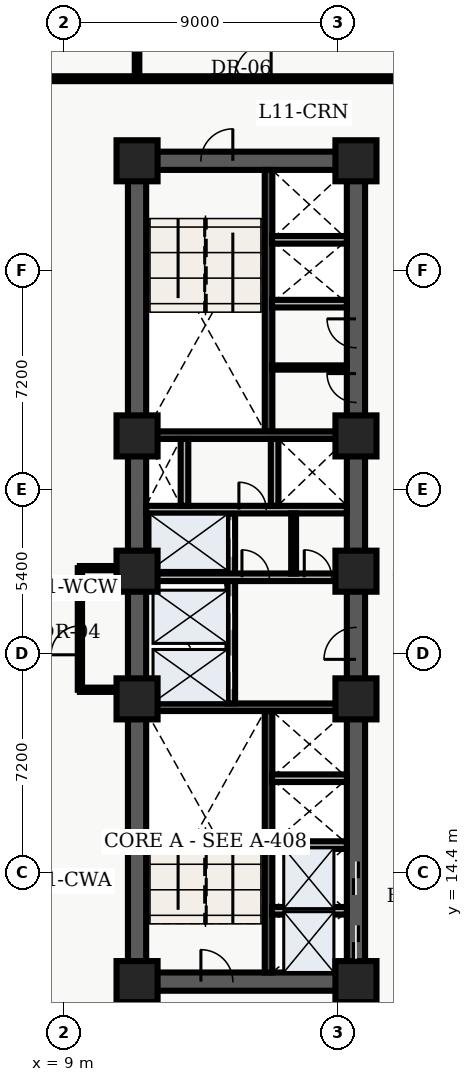
"""IFC4 building model, lengths in metres.
Left out: names, types, materials, properties, quantities, classifications, styles, units other than length and angle.
Written with IfcOpenShell. Run it as: python <this file> out.ifc"""

import sys

from ifc_helpers import new_model, entity, si_unit, converted_unit, direction, frame, origin_with_axes, origin_2d_with_axis, place, context, subcontext, project, spatial, polyline, rectangle, outline, extrude, element, fill, save


model = new_model("IFC4")
c1 = context("Model", 3, precision=1e-05, world=origin_with_axes(), true_north=direction((0.0, 1.0)))
c2 = subcontext(c1, "Body", "Model", "MODEL_VIEW")
j1 = project(units=[si_unit("LENGTHUNIT", "METRE"), converted_unit("PLANEANGLEUNIT", "DEGREE", entity("IfcPlaneAngleMeasure", 0.017), si_unit("PLANEANGLEUNIT", "RADIAN"), dimensions=[0, 0, 0, 0, 0, 0, 0])], contexts=[c1])
p1 = place(None, origin_with_axes())
s1 = spatial("IfcSite", under=j1, at=p1, CompositionType="ELEMENT")
p2 = place(p1, origin_with_axes())
s2 = spatial("IfcBuilding", under=s1, at=p2, CompositionType="ELEMENT")
p3 = place(p2, frame((0.0, 0.0, 48.3), z_axis=(0.0, 0.0, 1.0), x_axis=(1.0, 0.0, 0.0)))
s3 = spatial("IfcBuildingStorey", under=s2, at=p3, CompositionType="ELEMENT", Elevation=48.3)
p4 = place(p3, frame((11.4, 10.8, 0.0), z_axis=(0.0, 0.0, 1.0), x_axis=(0.0, 1.0, 0.0)))
e1 = element("IfcWall", 1, at=p4, inside=s3, PredefinedType="SHEAR", context=c2, shape_type="SweptSolid", body=[
    extrude(outline(polyline([(0.0, -0.3), (27.0, -0.3), (27.0, 0.3), (0.0, 0.3), (0.0, -0.3)])), origin_with_axes(), (0.0, 0.0, 1.0), 3.66),
])
p5 = place(p3, frame((11.4, 10.8, 0.0), z_axis=(0.0, 0.0, 1.0), x_axis=(1.0, 0.0, 0.0)))
e2 = element("IfcWall", 2, at=p5, inside=s3, PredefinedType="SHEAR", context=c2, shape_type="SweptSolid", body=[
    extrude(outline(polyline([(0.0, -0.3), (7.2, -0.3), (7.2, 0.3), (0.0, 0.3), (0.0, -0.3)])), origin_with_axes(), (0.0, 0.0, 1.0), 3.66),
])
p6 = place(p5, frame((2.625, 0.0, 0.0), z_axis=(0.0, 0.0, 1.0), x_axis=(1.0, 0.0, 0.0)))
e3 = element("IfcOpeningElement", 3, at=p6, cuts=e2, PredefinedType="OPENING", context=c2, shape_type="SweptSolid", body=[
    extrude(rectangle(XDim=1.05, YDim=0.62, at=origin_2d_with_axis()), origin_with_axes(), (0.0, 0.0, 1.0), 2.15),
])
p7 = place(p3, frame((11.4, 37.8, 0.0), z_axis=(0.0, 0.0, 1.0), x_axis=(1.0, 0.0, 0.0)))
e4 = element("IfcWall", 4, at=p7, inside=s3, PredefinedType="SHEAR", context=c2, shape_type="SweptSolid", body=[
    extrude(outline(polyline([(0.0, -0.3), (7.2, -0.3), (7.2, 0.3), (0.0, 0.3), (0.0, -0.3)])), origin_with_axes(), (0.0, 0.0, 1.0), 3.66),
])
p8 = place(p7, frame((2.625, 0.0, 0.0), z_axis=(0.0, 0.0, 1.0), x_axis=(1.0, 0.0, 0.0)))
e5 = element("IfcOpeningElement", 5, at=p8, cuts=e4, PredefinedType="OPENING", context=c2, shape_type="SweptSolid", body=[
    extrude(rectangle(XDim=1.05, YDim=0.62, at=origin_2d_with_axis()), origin_with_axes(), (0.0, 0.0, 1.0), 2.15),
])
p9 = place(p3, frame((18.6, 10.8, 0.0), z_axis=(0.0, 0.0, 1.0), x_axis=(0.0, 1.0, 0.0)))
e6 = element("IfcWall", 6, at=p9, inside=s3, PredefinedType="SHEAR", context=c2, shape_type="SweptSolid", body=[
    extrude(outline(polyline([(0.0, -0.3), (13.5, -0.3), (13.5, 0.3), (0.0, 0.3), (0.0, -0.3)])), origin_with_axes(), (0.0, 0.0, 1.0), 3.66),
])
p10 = place(p9, frame((1.3, 0.0, 0.0), z_axis=(0.0, 0.0, 1.0), x_axis=(1.0, 0.0, 0.0)))
e7 = element("IfcOpeningElement", 7, at=p10, cuts=e6, PredefinedType="OPENING", context=c2, shape_type="SweptSolid", body=[
    extrude(rectangle(XDim=1.1, YDim=0.62, at=origin_2d_with_axis()), origin_with_axes(), (0.0, 0.0, 1.0), 2.15),
])
p11 = place(p9, frame((3.4, 0.0, 0.0), z_axis=(0.0, 0.0, 1.0), x_axis=(1.0, 0.0, 0.0)))
e8 = element("IfcOpeningElement", 8, at=p11, cuts=e6, PredefinedType="OPENING", context=c2, shape_type="SweptSolid", body=[
    extrude(rectangle(XDim=1.1, YDim=0.62, at=origin_2d_with_axis()), origin_with_axes(), (0.0, 0.0, 1.0), 2.15),
])
p12 = place(p9, frame((11.125, 0.0, 0.0), z_axis=(0.0, 0.0, 1.0), x_axis=(1.0, 0.0, 0.0)))
e9 = element("IfcOpeningElement", 9, at=p12, cuts=e6, PredefinedType="OPENING", context=c2, shape_type="SweptSolid", body=[
    extrude(rectangle(XDim=1.05, YDim=0.62, at=origin_2d_with_axis()), origin_with_axes(), (0.0, 0.0, 1.0), 2.15),
])
p13 = place(p3, frame((18.6, 24.3, 0.0), z_axis=(0.0, 0.0, 1.0), x_axis=(0.0, 1.0, 0.0)))
e10 = element("IfcWall", 10, at=p13, inside=s3, PredefinedType="SHEAR", context=c2, shape_type="SweptSolid", body=[
    extrude(outline(polyline([(0.0, -0.3), (13.5, -0.3), (13.5, 0.3), (0.0, 0.3), (0.0, -0.3)])), origin_with_axes(), (0.0, 0.0, 1.0), 3.66),
])
p14 = place(p13, frame((6.025, 0.0, 0.0), z_axis=(0.0, 0.0, 1.0), x_axis=(1.0, 0.0, 0.0)))
e11 = element("IfcOpeningElement", 11, at=p14, cuts=e10, PredefinedType="OPENING", context=c2, shape_type="SweptSolid", body=[
    extrude(rectangle(XDim=0.95, YDim=0.62, at=origin_2d_with_axis()), origin_with_axes(), (0.0, 0.0, 1.0), 2.15),
])
p15 = place(p13, frame((7.825, 0.0, 0.0), z_axis=(0.0, 0.0, 1.0), x_axis=(1.0, 0.0, 0.0)))
e12 = element("IfcOpeningElement", 12, at=p15, cuts=e10, PredefinedType="OPENING", context=c2, shape_type="SweptSolid", body=[
    extrude(rectangle(XDim=0.95, YDim=0.62, at=origin_2d_with_axis()), origin_with_axes(), (0.0, 0.0, 1.0), 2.15),
])
p16 = place(p3, frame((15.725, 11.1, 0.0), z_axis=(0.0, 0.0, 1.0), x_axis=(0.0, 1.0, 0.0)))
e13 = element("IfcWall", 13, at=p16, inside=s3, PredefinedType="SHEAR", context=c2, shape_type="SweptSolid", body=[
    extrude(outline(polyline([(0.0, -0.125), (8.6, -0.125), (8.6, 0.125), (0.0, 0.125), (0.0, -0.125)])), origin_with_axes(), (0.0, 0.0, 1.0), 3.66),
])
p17 = place(p3, frame((11.7, 19.825, 0.0), z_axis=(0.0, 0.0, 1.0), x_axis=(1.0, 0.0, 0.0)))
e14 = element("IfcWall", 14, at=p17, inside=s3, PredefinedType="SHEAR", context=c2, shape_type="SweptSolid", body=[
    extrude(outline(polyline([(0.0, -0.125), (6.6, -0.125), (6.6, 0.125), (0.0, 0.125), (0.0, -0.125)])), origin_with_axes(), (0.0, 0.0, 1.0), 3.66),
])
p18 = place(p3, frame((15.725, 28.9, 0.0), z_axis=(0.0, 0.0, 1.0), x_axis=(0.0, 1.0, 0.0)))
e15 = element("IfcWall", 15, at=p18, inside=s3, PredefinedType="SHEAR", context=c2, shape_type="SweptSolid", body=[
    extrude(outline(polyline([(0.0, -0.125), (8.6, -0.125), (8.6, 0.125), (0.0, 0.125), (0.0, -0.125)])), origin_with_axes(), (0.0, 0.0, 1.0), 3.66),
])
p19 = place(p3, frame((11.7, 28.775, 0.0), z_axis=(0.0, 0.0, 1.0), x_axis=(1.0, 0.0, 0.0)))
e16 = element("IfcWall", 16, at=p19, inside=s3, PredefinedType="SHEAR", context=c2, shape_type="SweptSolid", body=[
    extrude(outline(polyline([(0.0, -0.125), (6.6, -0.125), (6.6, 0.125), (0.0, 0.125), (0.0, -0.125)])), origin_with_axes(), (0.0, 0.0, 1.0), 3.66),
])
p20 = place(p3, frame((14.5, 19.95, 0.0), z_axis=(0.0, 0.0, 1.0), x_axis=(0.0, 1.0, 0.0)))
e17 = element("IfcWall", 17, at=p20, inside=s3, PredefinedType="SOLIDWALL", context=c2, shape_type="SweptSolid", body=[
    extrude(outline(polyline([(0.0, -0.125), (6.25, -0.125), (6.25, 0.125), (0.0, 0.125), (0.0, -0.125)])), origin_with_axes(), (0.0, 0.0, 1.0), 2.7),
])
p21 = place(p20, frame((1.025, 0.0, 0.0), z_axis=(0.0, 0.0, 1.0), x_axis=(1.0, 0.0, 0.0)))
e18 = element("IfcOpeningElement", 18, at=p21, cuts=e17, PredefinedType="OPENING", context=c2, shape_type="SweptSolid", body=[
    extrude(rectangle(XDim=1.1, YDim=0.27, at=origin_2d_with_axis()), origin_with_axes(), (0.0, 0.0, 1.0), 2.15),
])
p22 = place(p20, frame((2.975, 0.0, 0.0), z_axis=(0.0, 0.0, 1.0), x_axis=(1.0, 0.0, 0.0)))
e19 = element("IfcOpeningElement", 19, at=p22, cuts=e17, PredefinedType="OPENING", context=c2, shape_type="SweptSolid", body=[
    extrude(rectangle(XDim=1.1, YDim=0.27, at=origin_2d_with_axis()), origin_with_axes(), (0.0, 0.0, 1.0), 2.15),
])
p23 = place(p20, frame((5.425, 0.0, 0.0), z_axis=(0.0, 0.0, 1.0), x_axis=(1.0, 0.0, 0.0)))
e20 = element("IfcOpeningElement", 20, at=p23, cuts=e17, PredefinedType="OPENING", context=c2, shape_type="SweptSolid", body=[
    extrude(rectangle(XDim=1.2, YDim=0.27, at=origin_2d_with_axis()), origin_with_axes(), (0.0, 0.0, 1.0), 2.15),
])
p24 = place(p3, frame((11.7, 24.1, 0.0), z_axis=(0.0, 0.0, 1.0), x_axis=(1.0, 0.0, 0.0)))
e21 = element("IfcWall", 21, at=p24, inside=s3, PredefinedType="SOLIDWALL", context=c2, shape_type="SweptSolid", body=[
    extrude(outline(polyline([(0.0, -0.125), (6.6, -0.125), (6.6, 0.125), (0.0, 0.125), (0.0, -0.125)])), origin_with_axes(), (0.0, 0.0, 1.0), 2.7),
])
p25 = place(p24, frame((3.6, 0.0, 0.0), z_axis=(0.0, 0.0, 1.0), x_axis=(1.0, 0.0, 0.0)))
e22 = element("IfcOpeningElement", 22, at=p25, cuts=e21, PredefinedType="OPENING", context=c2, shape_type="SweptSolid", body=[
    extrude(rectangle(XDim=0.9, YDim=0.27, at=origin_2d_with_axis()), origin_with_axes(), (0.0, 0.0, 1.0), 2.15),
])
p26 = place(p24, frame((5.65, 0.0, 0.0), z_axis=(0.0, 0.0, 1.0), x_axis=(1.0, 0.0, 0.0)))
e23 = element("IfcOpeningElement", 23, at=p26, cuts=e21, PredefinedType="OPENING", context=c2, shape_type="SweptSolid", body=[
    extrude(rectangle(XDim=0.9, YDim=0.27, at=origin_2d_with_axis()), origin_with_axes(), (0.0, 0.0, 1.0), 2.15),
])
p27 = place(p3, frame((11.7, 26.325, 0.0), z_axis=(0.0, 0.0, 1.0), x_axis=(1.0, 0.0, 0.0)))
e24 = element("IfcWall", 24, at=p27, inside=s3, PredefinedType="SOLIDWALL", context=c2, shape_type="SweptSolid", body=[
    extrude(outline(polyline([(0.0, -0.125), (6.6, -0.125), (6.6, 0.125), (0.0, 0.125), (0.0, -0.125)])), origin_with_axes(), (0.0, 0.0, 1.0), 2.7),
])
p28 = place(p27, frame((3.5, 0.0, 0.0), z_axis=(0.0, 0.0, 1.0), x_axis=(1.0, 0.0, 0.0)))
e25 = element("IfcOpeningElement", 25, at=p28, cuts=e24, PredefinedType="OPENING", context=c2, shape_type="SweptSolid", body=[
    extrude(rectangle(XDim=0.9, YDim=0.27, at=origin_2d_with_axis()), origin_with_axes(), (0.0, 0.0, 1.0), 2.15),
])
for number, where, z_axis, x_axis in (
    (26, (12.96, 26.45, 0.0), (0.0, 0.0, 1.0), (0.0, 1.0, 0.0)),
    (27, (15.925, 26.45, 0.0), (0.0, 0.0, 1.0), (0.0, 1.0, 0.0)),
):
    element("IfcWall", number, at=place(p3, frame(where, z_axis=z_axis, x_axis=x_axis)), inside=s3, PredefinedType="SOLIDWALL", context=c2, shape_type="SweptSolid", body=[
        extrude(outline(polyline([(0.0, -0.125), (2.2, -0.125), (2.2, 0.125), (0.0, 0.125), (0.0, -0.125)])), origin_with_axes(), (0.0, 0.0, 1.0), 2.7),
    ])
for number, where, z_axis, x_axis in (
    (28, (11.4, 10.8, 0.0), (0.0, 0.0, 1.0), (1.0, 0.0, 0.0)),
    (29, (11.4, 20.1, 0.0), (0.0, 0.0, 1.0), (1.0, 0.0, 0.0)),
    (30, (11.4, 24.3, 0.0), (0.0, 0.0, 1.0), (1.0, 0.0, 0.0)),
    (31, (11.4, 28.75, 0.0), (0.0, 0.0, 1.0), (1.0, 0.0, 0.0)),
    (32, (11.4, 37.8, 0.0), (0.0, 0.0, 1.0), (1.0, 0.0, 0.0)),
    (33, (18.6, 10.8, 0.0), (0.0, 0.0, 1.0), (1.0, 0.0, 0.0)),
    (34, (18.6, 20.1, 0.0), (0.0, 0.0, 1.0), (1.0, 0.0, 0.0)),
    (35, (18.6, 24.3, 0.0), (0.0, 0.0, 1.0), (1.0, 0.0, 0.0)),
    (36, (18.6, 28.75, 0.0), (0.0, 0.0, 1.0), (1.0, 0.0, 0.0)),
    (37, (18.6, 37.8, 0.0), (0.0, 0.0, 1.0), (1.0, 0.0, 0.0)),
):
    element("IfcColumn", number, at=place(p3, frame(where, z_axis=z_axis, x_axis=x_axis)), inside=s3, PredefinedType="COLUMN", context=c2, shape_type="SweptSolid", body=[
        extrude(rectangle(XDim=1.35, YDim=1.35, at=origin_2d_with_axis()), origin_with_axes(), (0.0, 0.0, 1.0), 3.9),
    ])
p29 = place(p3, frame((16.55, 24.22, 0.0), z_axis=(0.0, 0.0, 1.0), x_axis=(0.0, 1.0, 0.0)))
e38 = element("IfcWall", 38, at=p29, inside=s3, PredefinedType="PARTITIONING", context=c2, shape_type="SweptSolid", body=[
    extrude(outline(polyline([(0.0, -0.08), (1.98, -0.08), (1.98, 0.08), (0.0, 0.08), (0.0, -0.08)])), origin_with_axes(), (0.0, 0.0, 1.0), 2.7),
])
for number, where, z_axis, x_axis in (
    (39, (15.84, 13.13, 0.0), (0.0, 0.0, 1.0), (1.0, 0.0, 0.0)),
    (40, (15.84, 15.29, 0.0), (0.0, 0.0, 1.0), (1.0, 0.0, 0.0)),
    (41, (15.84, 17.49, 0.0), (0.0, 0.0, 1.0), (1.0, 0.0, 0.0)),
    (42, (15.84, 33.1, 0.0), (0.0, 0.0, 1.0), (1.0, 0.0, 0.0)),
    (43, (15.84, 35.2, 0.0), (0.0, 0.0, 1.0), (1.0, 0.0, 0.0)),
):
    element("IfcWall", number, at=place(p3, frame(where, z_axis=z_axis, x_axis=x_axis)), inside=s3, PredefinedType="SOLIDWALL", context=c2, shape_type="SweptSolid", body=[
        extrude(outline(polyline([(0.0, -0.125), (2.46, -0.125), (2.46, 0.125), (0.0, 0.125), (0.0, -0.125)])), origin_with_axes(), (0.0, 0.0, 1.0), 2.7),
    ])
p30 = place(p3, frame((15.84, 31.0, 0.0), z_axis=(0.0, 0.0, 1.0), x_axis=(1.0, 0.0, 0.0)))
e44 = element("IfcWall", 44, at=p30, inside=s3, PredefinedType="PARTITIONING", context=c2, shape_type="SweptSolid", body=[
    extrude(outline(polyline([(0.0, -0.07), (2.46, -0.07), (2.46, 0.07), (0.0, 0.07), (0.0, -0.07)])), origin_with_axes(), (0.0, 0.0, 1.0), 2.7),
])
p31 = place(p3, frame((9.52, 20.4, 0.0), z_axis=(0.0, 0.0, 1.0), x_axis=(0.0, 1.0, 0.0)))
e45 = element("IfcWall", 45, at=p31, inside=s3, PredefinedType="PARTITIONING", context=c2, shape_type="SweptSolid", body=[
    extrude(outline(polyline([(0.0, -0.07), (4.0, -0.07), (4.0, 0.07), (0.0, 0.07), (0.0, -0.07)])), origin_with_axes(), (0.0, 0.0, 1.0), 2.7),
])
p32 = place(p31, frame((1.625, 0.0, 0.0), z_axis=(0.0, 0.0, 1.0), x_axis=(1.0, 0.0, 0.0)))
e46 = element("IfcOpeningElement", 46, at=p32, cuts=e45, PredefinedType="OPENING", context=c2, shape_type="SweptSolid", body=[
    extrude(rectangle(XDim=0.95, YDim=0.16, at=origin_2d_with_axis()), origin_with_axes(), (0.0, 0.0, 1.0), 2.15),
])
for number, where, z_axis, x_axis in (
    (47, (9.52, 20.4, 0.0), (0.0, 0.0, 1.0), (1.0, 0.0, 0.0)),
    (48, (9.52, 24.4, 0.0), (0.0, 0.0, 1.0), (1.0, 0.0, 0.0)),
):
    element("IfcWall", number, at=place(p3, frame(where, z_axis=z_axis, x_axis=x_axis)), inside=s3, PredefinedType="PARTITIONING", context=c2, shape_type="SweptSolid", body=[
        extrude(outline(polyline([(0.0, -0.07), (1.58, -0.07), (1.58, 0.07), (0.0, 0.07), (0.0, -0.07)])), origin_with_axes(), (0.0, 0.0, 1.0), 2.7),
    ])
p33 = place(p3, frame((2.6, 40.5, 0.0), z_axis=(0.0, 0.0, 1.0), x_axis=(1.0, 0.0, 0.0)))
e49 = element("IfcWall", 49, at=p33, inside=s3, PredefinedType="PARTITIONING", context=c2, shape_type="SweptSolid", body=[
    extrude(outline(polyline([(0.0, -0.08), (18.65, -0.08), (18.65, 0.08), (0.0, 0.08), (0.0, -0.08)])), origin_with_axes(), (0.0, 0.0, 1.0), 2.7),
])
p34 = place(p33, frame((5.275, 0.0, 0.0), z_axis=(0.0, 0.0, 1.0), x_axis=(1.0, 0.0, 0.0)))
e50 = element("IfcOpeningElement", 50, at=p34, cuts=e49, PredefinedType="OPENING", context=c2, shape_type="SweptSolid", body=[
    extrude(rectangle(XDim=1.0, YDim=0.18, at=origin_2d_with_axis()), origin_with_axes(), (0.0, 0.0, 1.0), 2.15),
])
p35 = place(p33, frame((12.61, 0.0, 0.0), z_axis=(0.0, 0.0, 1.0), x_axis=(1.0, 0.0, 0.0)))
e51 = element("IfcOpeningElement", 51, at=p35, cuts=e49, PredefinedType="OPENING", context=c2, shape_type="SweptSolid", body=[
    extrude(rectangle(XDim=1.2, YDim=0.18, at=origin_2d_with_axis()), origin_with_axes(), (0.0, 0.0, 1.0), 2.2),
])
p36 = place(p3, frame((11.4, 40.6, 0.0), z_axis=(0.0, 0.0, 1.0), x_axis=(0.0, 1.0, 0.0)))
e52 = element("IfcWall", 52, at=p36, inside=s3, PredefinedType="PARTITIONING", context=c2, shape_type="SweptSolid", body=[
    extrude(outline(polyline([(0.0, -0.075), (7.64, -0.075), (7.64, 0.075), (0.0, 0.075), (0.0, -0.075)])), origin_with_axes(), (0.0, 0.0, 1.0), 2.7),
])
p37 = place(p9, frame((1.3, 0.0, 0.0), z_axis=(0.0, 0.0, 1.0), x_axis=(1.0, 0.0, 0.0)))
e53 = element("IfcDoor", 53, at=p37, inside=s3, OperationType="SLIDING_TO_LEFT", PredefinedType="DOOR", context=c2, shape_type="SweptSolid", body=[
    extrude(rectangle(XDim=1.1, YDim=0.09, at=origin_2d_with_axis()), origin_with_axes(), (0.0, 0.0, 1.0), 2.15),
])
fill(e7, e53)
p38 = place(p9, frame((3.4, 0.0, 0.0), z_axis=(0.0, 0.0, 1.0), x_axis=(1.0, 0.0, 0.0)))
e54 = element("IfcDoor", 54, at=p38, inside=s3, OperationType="SLIDING_TO_RIGHT", PredefinedType="DOOR", context=c2, shape_type="SweptSolid", body=[
    extrude(rectangle(XDim=1.1, YDim=0.09, at=origin_2d_with_axis()), origin_with_axes(), (0.0, 0.0, 1.0), 2.15),
])
fill(e8, e54)
p39 = place(p20, frame((1.025, 0.0, 0.0), z_axis=(0.0, 0.0, 1.0), x_axis=(1.0, 0.0, 0.0)))
e55 = element("IfcDoor", 55, at=p39, inside=s3, OperationType="SLIDING_TO_LEFT", PredefinedType="DOOR", context=c2, shape_type="SweptSolid", body=[
    extrude(rectangle(XDim=1.1, YDim=0.09, at=origin_2d_with_axis()), origin_with_axes(), (0.0, 0.0, 1.0), 2.15),
])
fill(e18, e55)
p40 = place(p20, frame((2.975, 0.0, 0.0), z_axis=(0.0, 0.0, 1.0), x_axis=(1.0, 0.0, 0.0)))
e56 = element("IfcDoor", 56, at=p40, inside=s3, OperationType="SLIDING_TO_RIGHT", PredefinedType="DOOR", context=c2, shape_type="SweptSolid", body=[
    extrude(rectangle(XDim=1.1, YDim=0.09, at=origin_2d_with_axis()), origin_with_axes(), (0.0, 0.0, 1.0), 2.15),
])
fill(e19, e56)
p41 = place(p20, frame((5.425, 0.0, 0.0), z_axis=(0.0, 0.0, 1.0), x_axis=(1.0, 0.0, 0.0)))
e57 = element("IfcDoor", 57, at=p41, inside=s3, OperationType="DOUBLE_DOOR_SLIDING", PredefinedType="DOOR", context=c2, shape_type="SweptSolid", body=[
    extrude(rectangle(XDim=1.2, YDim=0.09, at=origin_2d_with_axis()), origin_with_axes(), (0.0, 0.0, 1.0), 2.15),
])
fill(e20, e57)
p42 = place(p5, frame((2.625, 0.0, 0.0), z_axis=(0.0, 0.0, 1.0), x_axis=(1.0, 0.0, 0.0)))
e58 = element("IfcDoor", 58, at=p42, inside=s3, OperationType="SINGLE_SWING_LEFT", PredefinedType="DOOR", context=c2, shape_type="SweptSolid", body=[
    extrude(rectangle(XDim=1.05, YDim=0.09, at=origin_2d_with_axis()), origin_with_axes(), (0.0, 0.0, 1.0), 2.15),
])
fill(e3, e58)
p43 = place(p7, frame((2.625, 0.0, 0.0), z_axis=(0.0, 0.0, 1.0), x_axis=(1.0, 0.0, 0.0)))
e59 = element("IfcDoor", 59, at=p43, inside=s3, OperationType="SINGLE_SWING_RIGHT", PredefinedType="DOOR", context=c2, shape_type="SweptSolid", body=[
    extrude(rectangle(XDim=1.05, YDim=0.09, at=origin_2d_with_axis()), origin_with_axes(), (0.0, 0.0, 1.0), 2.15),
])
fill(e5, e59)
p44 = place(p9, frame((11.125, 0.0, 0.0), z_axis=(0.0, 0.0, 1.0), x_axis=(1.0, 0.0, 0.0)))
e60 = element("IfcDoor", 60, at=p44, inside=s3, OperationType="SINGLE_SWING_LEFT", PredefinedType="DOOR", context=c2, shape_type="SweptSolid", body=[
    extrude(rectangle(XDim=1.05, YDim=0.09, at=origin_2d_with_axis()), origin_with_axes(), (0.0, 0.0, 1.0), 2.15),
])
fill(e9, e60)
p45 = place(p24, frame((3.6, 0.0, 0.0), z_axis=(0.0, 0.0, 1.0), x_axis=(1.0, 0.0, 0.0)))
e61 = element("IfcDoor", 61, at=p45, inside=s3, OperationType="SINGLE_SWING_LEFT", PredefinedType="DOOR", context=c2, shape_type="SweptSolid", body=[
    extrude(rectangle(XDim=0.9, YDim=0.09, at=origin_2d_with_axis()), origin_with_axes(), (0.0, 0.0, 1.0), 2.15),
])
fill(e22, e61)
p46 = place(p24, frame((5.65, 0.0, 0.0), z_axis=(0.0, 0.0, 1.0), x_axis=(1.0, 0.0, 0.0)))
e62 = element("IfcDoor", 62, at=p46, inside=s3, OperationType="SINGLE_SWING_LEFT", PredefinedType="DOOR", context=c2, shape_type="SweptSolid", body=[
    extrude(rectangle(XDim=0.9, YDim=0.09, at=origin_2d_with_axis()), origin_with_axes(), (0.0, 0.0, 1.0), 2.15),
])
fill(e23, e62)
p47 = place(p27, frame((3.5, 0.0, 0.0), z_axis=(0.0, 0.0, 1.0), x_axis=(1.0, 0.0, 0.0)))
e63 = element("IfcDoor", 63, at=p47, inside=s3, OperationType="SINGLE_SWING_LEFT", PredefinedType="DOOR", context=c2, shape_type="SweptSolid", body=[
    extrude(rectangle(XDim=0.9, YDim=0.09, at=origin_2d_with_axis()), origin_with_axes(), (0.0, 0.0, 1.0), 2.15),
])
fill(e25, e63)
p48 = place(p13, frame((6.025, 0.0, 0.0), z_axis=(0.0, 0.0, 1.0), x_axis=(1.0, 0.0, 0.0)))
e64 = element("IfcDoor", 64, at=p48, inside=s3, OperationType="SINGLE_SWING_RIGHT", PredefinedType="DOOR", context=c2, shape_type="SweptSolid", body=[
    extrude(rectangle(XDim=0.95, YDim=0.09, at=origin_2d_with_axis()), origin_with_axes(), (0.0, 0.0, 1.0), 2.15),
])
fill(e11, e64)
p49 = place(p13, frame((7.825, 0.0, 0.0), z_axis=(0.0, 0.0, 1.0), x_axis=(1.0, 0.0, 0.0)))
e65 = element("IfcDoor", 65, at=p49, inside=s3, OperationType="SINGLE_SWING_RIGHT", PredefinedType="DOOR", context=c2, shape_type="SweptSolid", body=[
    extrude(rectangle(XDim=0.95, YDim=0.09, at=origin_2d_with_axis()), origin_with_axes(), (0.0, 0.0, 1.0), 2.15),
])
fill(e12, e65)
p50 = place(p31, frame((1.625, 0.0, 0.0), z_axis=(0.0, 0.0, 1.0), x_axis=(1.0, 0.0, 0.0)))
e66 = element("IfcDoor", 66, at=p50, inside=s3, OperationType="SINGLE_SWING_LEFT", PredefinedType="DOOR", context=c2, shape_type="SweptSolid", body=[
    extrude(rectangle(XDim=0.95, YDim=0.084, at=origin_2d_with_axis()), origin_with_axes(), (0.0, 0.0, 1.0), 2.15),
])
fill(e46, e66)
p51 = place(p33, frame((12.61, 0.0, 0.0), z_axis=(0.0, 0.0, 1.0), x_axis=(1.0, 0.0, 0.0)))
e67 = element("IfcDoor", 67, at=p51, inside=s3, OperationType="SINGLE_SWING_RIGHT", PredefinedType="DOOR", context=c2, shape_type="SweptSolid", body=[
    extrude(rectangle(XDim=1.2, YDim=0.09, at=origin_2d_with_axis()), origin_with_axes(), (0.0, 0.0, 1.0), 2.2),
])
fill(e51, e67)
save(model, sys.argv[1])
